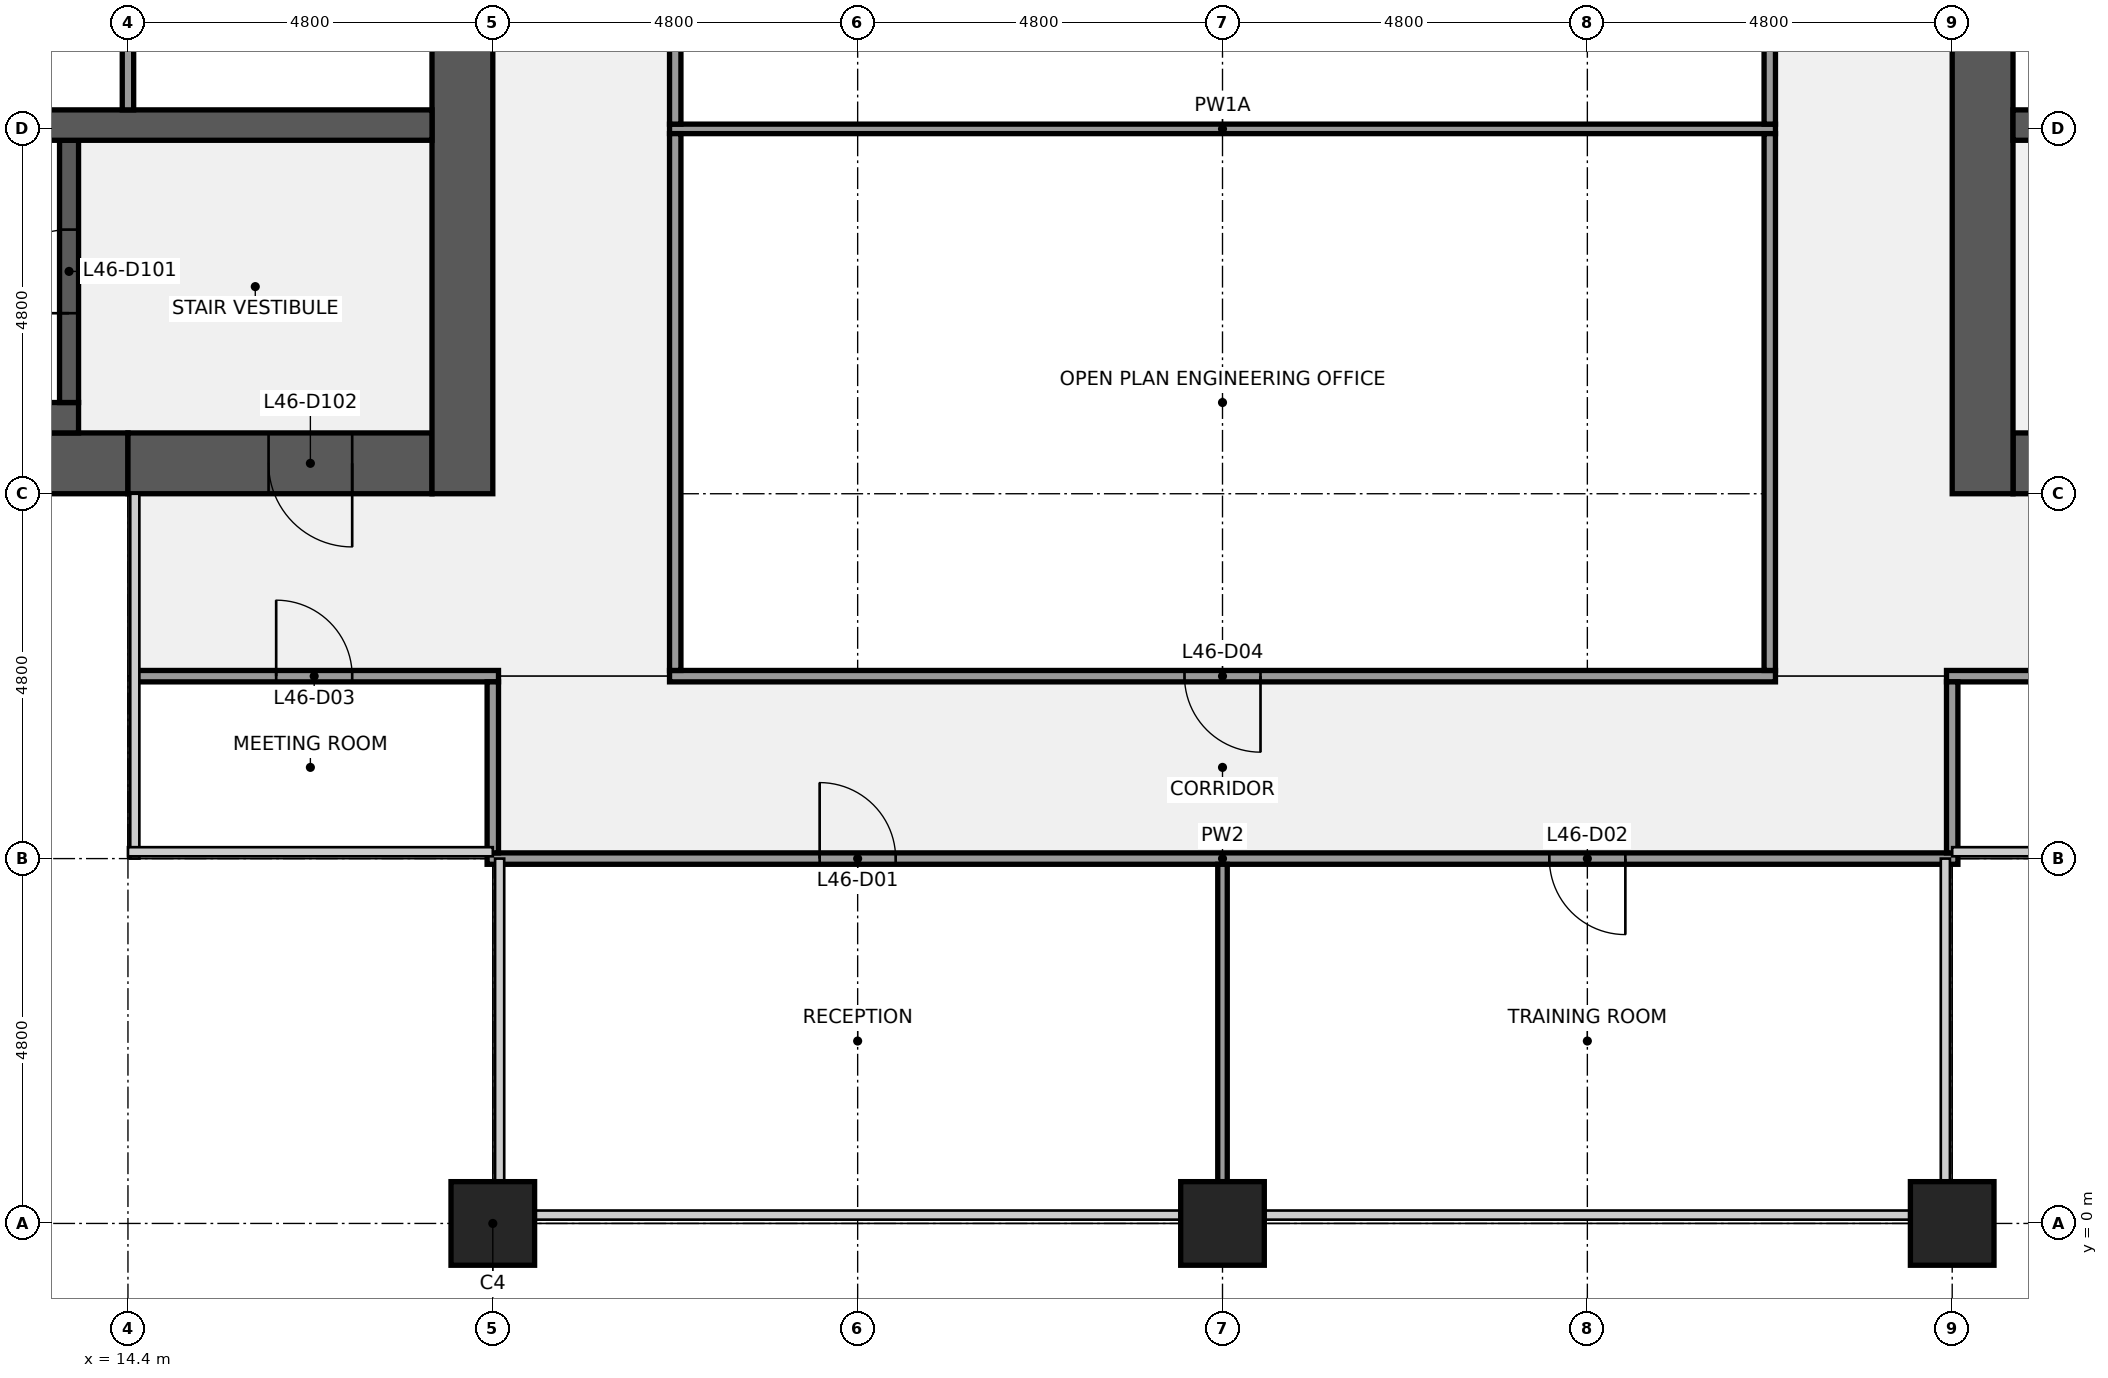
"""IFC4 building model, lengths in metres.
Left out: names, types, materials, properties, quantities, classifications, styles, units other than length and angle.
Written with IfcOpenShell. Run it as: python <this file> out.ifc"""

import sys

from ifc_helpers import new_model, si_unit, direction, frame, frame_2d, origin, origin_2d, place, context, subcontext, project, spatial, rectangle, extrude, element, fill, save


model = new_model("IFC4")
c1 = context("Model", 3, precision=1e-05, world=origin(), true_north=direction((0.0, 1.0)))
c2 = subcontext(c1, "Body", "Model", "MODEL_VIEW")
j1 = project(units=[si_unit("LENGTHUNIT", "METRE"), si_unit("PLANEANGLEUNIT", "RADIAN")], contexts=[c1])
p1 = place(None, origin())
s1 = spatial("IfcSite", under=j1, at=p1, CompositionType="ELEMENT")
p2 = place(p1, origin())
s2 = spatial("IfcBuilding", under=s1, at=p2, CompositionType="ELEMENT")
p3 = place(p2, frame((0.0, 0.0, 213.2)))
s3 = spatial("IfcBuildingStorey", under=s2, at=p3, CompositionType="ELEMENT", Elevation=213.2)
for number, where, z_axis, x_axis in (
    (1, (19.2, 0.0, 0.0), (0.0, 0.0, 1.0), (1.0, 0.0, 0.0)),
    (2, (28.8, 0.0, 0.0), (0.0, 0.0, 1.0), (1.0, 0.0, 0.0)),
    (3, (38.4, 0.0, 0.0), (0.0, 0.0, 1.0), (1.0, 0.0, 0.0)),
):
    element("IfcColumn", number, at=place(p3, frame(where, z_axis=z_axis, x_axis=x_axis)), inside=s3, PredefinedType="COLUMN", context=c2, shape_type="SweptSolid", body=[
        extrude(rectangle(XDim=1.1, YDim=1.1, at=origin_2d()), origin(), (0.0, 0.0, 1.0), 4.0),
    ])
p4 = place(p3, frame((14.4, 10.0, 0.0), z_axis=(0.0, 0.0, 1.0), x_axis=(-1.0, 0.0, 0.0)))
e4 = element("IfcWall", 4, at=p4, inside=s3, PredefinedType="SHEAR", context=c2, shape_type="SweptSolid", body=[
    extrude(rectangle(XDim=13.6, YDim=0.8, at=frame_2d((6.8, 0.0))), origin(), (0.0, 0.0, 1.0), 3.84),
])
p5 = place(p4, frame((6.3, 0.0, 0.9)))
e5 = element("IfcOpeningElement", 5, at=p5, cuts=e4, PredefinedType="OPENING", context=c2, shape_type="SweptSolid", body=[
    extrude(rectangle(XDim=1.8, YDim=1.5, at=frame_2d((0.9, 0.75))), frame((0.0, 0.41, 0.0), z_axis=(0.0, -1.0, 0.0), x_axis=(1.0, 0.0, 0.0)), (0.0, 0.0, 1.0), 0.82),
])
p6 = place(p4, frame((1.5, 0.0, 0.9)))
e6 = element("IfcOpeningElement", 6, at=p6, cuts=e4, PredefinedType="OPENING", context=c2, shape_type="SweptSolid", body=[
    extrude(rectangle(XDim=1.8, YDim=1.5, at=frame_2d((0.9, 0.75))), frame((0.0, 0.41, 0.0), z_axis=(0.0, -1.0, 0.0), x_axis=(1.0, 0.0, 0.0)), (0.0, 0.0, 1.0), 0.82),
])
p7 = place(p3, frame((18.4, 10.0, 0.0), z_axis=(0.0, 0.0, 1.0), x_axis=(-1.0, 0.0, 0.0)))
e7 = element("IfcWall", 7, at=p7, inside=s3, PredefinedType="SHEAR", context=c2, shape_type="SweptSolid", body=[
    extrude(rectangle(XDim=4.0, YDim=0.8, at=frame_2d((2.0, 0.0))), origin(), (0.0, 0.0, 1.0), 3.84),
])
p8 = place(p7, frame((1.05, 0.0, 0.0)))
e8 = element("IfcOpeningElement", 8, at=p8, cuts=e7, PredefinedType="OPENING", context=c2, shape_type="SweptSolid", body=[
    extrude(rectangle(XDim=1.1, YDim=2.1, at=frame_2d((0.55, 1.05))), frame((0.0, 0.41, 0.0), z_axis=(0.0, -1.0, 0.0), x_axis=(1.0, 0.0, 0.0)), (0.0, 0.0, 1.0), 0.82),
])
p9 = place(p3, frame((18.8, 38.4, 0.0), z_axis=(0.0, 0.0, 1.0), x_axis=(0.0, -1.0, 0.0)))
e9 = element("IfcWall", 9, at=p9, inside=s3, PredefinedType="SHEAR", context=c2, shape_type="SweptSolid", body=[
    extrude(rectangle(XDim=28.8, YDim=0.8, at=frame_2d((14.4, 0.0))), origin(), (0.0, 0.0, 1.0), 3.84),
])
p10 = place(p9, frame((18.3, 0.0, 0.0)))
e10 = element("IfcOpeningElement", 10, at=p10, cuts=e9, PredefinedType="OPENING", context=c2, shape_type="SweptSolid", body=[
    extrude(rectangle(XDim=1.8, YDim=2.1, at=frame_2d((0.9, 1.05))), frame((0.0, 0.41, 0.0), z_axis=(0.0, -1.0, 0.0), x_axis=(1.0, 0.0, 0.0)), (0.0, 0.0, 1.0), 0.82),
])
p11 = place(p9, frame((8.7, 0.0, 0.0)))
e11 = element("IfcOpeningElement", 11, at=p11, cuts=e9, PredefinedType="OPENING", context=c2, shape_type="SweptSolid", body=[
    extrude(rectangle(XDim=1.8, YDim=2.1, at=frame_2d((0.9, 1.05))), frame((0.0, 0.41, 0.0), z_axis=(0.0, -1.0, 0.0), x_axis=(1.0, 0.0, 0.0)), (0.0, 0.0, 1.0), 0.82),
])
p12 = place(p3, frame((6.25, 10.6, 0.0), z_axis=(0.0, 0.0, 1.0), x_axis=(1.0, 0.0, 0.0)))
e12 = element("IfcWall", 12, at=p12, inside=s3, PredefinedType="SHEAR", context=c2, shape_type="SweptSolid", body=[
    extrude(rectangle(XDim=7.5, YDim=0.4, at=frame_2d((3.75, 0.0))), origin(), (0.0, 0.0, 1.0), 3.84),
])
p13 = place(p3, frame((13.625, 10.8, 0.0), z_axis=(0.0, 0.0, 1.0), x_axis=(0.0, 1.0, 0.0)))
e13 = element("IfcWall", 13, at=p13, inside=s3, PredefinedType="SHEAR", context=c2, shape_type="SweptSolid", body=[
    extrude(rectangle(XDim=3.45, YDim=0.25, at=frame_2d((1.725, 0.0))), origin(), (0.0, 0.0, 1.0), 3.84),
])
p14 = place(p13, frame((1.175, 0.0, 0.0)))
e14 = element("IfcOpeningElement", 14, at=p14, cuts=e13, PredefinedType="OPENING", context=c2, shape_type="SweptSolid", body=[
    extrude(rectangle(XDim=1.1, YDim=2.1, at=frame_2d((0.55, 1.05))), frame((0.0, 0.135, 0.0), z_axis=(0.0, -1.0, 0.0), x_axis=(1.0, 0.0, 0.0)), (0.0, 0.0, 1.0), 0.27),
])
p15 = place(p3, frame((0.8, 14.45, 0.0), z_axis=(0.0, 0.0, 1.0), x_axis=(1.0, 0.0, 0.0)))
e15 = element("IfcWall", 15, at=p15, inside=s3, PredefinedType="SHEAR", context=c2, shape_type="SweptSolid", body=[
    extrude(rectangle(XDim=17.6, YDim=0.4, at=frame_2d((8.8, 0.0))), origin(), (0.0, 0.0, 1.0), 3.84),
])
p16 = place(p3, frame((14.4, 14.65, 0.0), z_axis=(0.0, 0.0, 1.0), x_axis=(0.0, 1.0, 0.0)))
e16 = element("IfcWall", 16, at=p16, inside=s3, PredefinedType="PARTITIONING", context=c2, shape_type="SweptSolid", body=[
    extrude(rectangle(XDim=2.6, YDim=0.15, at=frame_2d((1.3, 0.0))), origin(), (0.0, 0.0, 1.0), 3.84),
])
p17 = place(p3, frame((48.0, 10.0, 0.0), z_axis=(0.0, 0.0, 1.0), x_axis=(-1.0, 0.0, 0.0)))
e17 = element("IfcWall", 17, at=p17, inside=s3, PredefinedType="SHEAR", context=c2, shape_type="SweptSolid", body=[
    extrude(rectangle(XDim=8.8, YDim=0.8, at=frame_2d((4.4, 0.0))), origin(), (0.0, 0.0, 1.0), 3.84),
])
p18 = place(p17, frame((6.65, 0.0, 0.0)))
e18 = element("IfcOpeningElement", 18, at=p18, cuts=e17, PredefinedType="OPENING", context=c2, shape_type="SweptSolid", body=[
    extrude(rectangle(XDim=1.1, YDim=2.1, at=frame_2d((0.55, 1.05))), frame((0.0, 0.41, 0.0), z_axis=(0.0, -1.0, 0.0), x_axis=(1.0, 0.0, 0.0)), (0.0, 0.0, 1.0), 0.82),
])
p19 = place(p3, frame((38.8, 9.6, 0.0), z_axis=(0.0, 0.0, 1.0), x_axis=(0.0, 1.0, 0.0)))
e19 = element("IfcWall", 19, at=p19, inside=s3, PredefinedType="SHEAR", context=c2, shape_type="SweptSolid", body=[
    extrude(rectangle(XDim=28.8, YDim=0.8, at=frame_2d((14.4, 0.0))), origin(), (0.0, 0.0, 1.0), 3.84),
])
p20 = place(p19, frame((8.7, 0.0, 0.0)))
e20 = element("IfcOpeningElement", 20, at=p20, cuts=e19, PredefinedType="OPENING", context=c2, shape_type="SweptSolid", body=[
    extrude(rectangle(XDim=1.8, YDim=2.1, at=frame_2d((0.9, 1.05))), frame((0.0, 0.41, 0.0), z_axis=(0.0, -1.0, 0.0), x_axis=(1.0, 0.0, 0.0)), (0.0, 0.0, 1.0), 0.82),
])
p21 = place(p19, frame((18.3, 0.0, 0.0)))
e21 = element("IfcOpeningElement", 21, at=p21, cuts=e19, PredefinedType="OPENING", context=c2, shape_type="SweptSolid", body=[
    extrude(rectangle(XDim=1.8, YDim=2.1, at=frame_2d((0.9, 1.05))), frame((0.0, 0.41, 0.0), z_axis=(0.0, -1.0, 0.0), x_axis=(1.0, 0.0, 0.0)), (0.0, 0.0, 1.0), 0.82),
])
p22 = place(p3, frame((39.2, 14.45, 0.0), z_axis=(0.0, 0.0, 1.0), x_axis=(1.0, 0.0, 0.0)))
e22 = element("IfcWall", 22, at=p22, inside=s3, PredefinedType="SHEAR", context=c2, shape_type="SweptSolid", body=[
    extrude(rectangle(XDim=17.6, YDim=0.4, at=frame_2d((8.8, 0.0))), origin(), (0.0, 0.0, 1.0), 3.84),
])
p23 = place(p3, frame((19.125, 4.8, 0.0), z_axis=(0.0, 0.0, 1.0), x_axis=(1.0, 0.0, 0.0)))
e23 = element("IfcWall", 23, at=p23, inside=s3, PredefinedType="PARTITIONING", context=c2, shape_type="SweptSolid", body=[
    extrude(rectangle(XDim=19.35, YDim=0.15, at=frame_2d((9.675, 0.0))), origin(), (0.0, 0.0, 1.0), 2.87),
])
p24 = place(p23, frame((4.375, 0.0, 0.0)))
e24 = element("IfcOpeningElement", 24, at=p24, cuts=e23, PredefinedType="OPENING", context=c2, shape_type="SweptSolid", body=[
    extrude(rectangle(XDim=1.0, YDim=2.1, at=frame_2d((0.5, 1.05))), frame((0.0, 0.085, 0.0), z_axis=(0.0, -1.0, 0.0), x_axis=(1.0, 0.0, 0.0)), (0.0, 0.0, 1.0), 0.17),
])
p25 = place(p23, frame((13.975, 0.0, 0.0)))
e25 = element("IfcOpeningElement", 25, at=p25, cuts=e23, PredefinedType="OPENING", context=c2, shape_type="SweptSolid", body=[
    extrude(rectangle(XDim=1.0, YDim=2.1, at=frame_2d((0.5, 1.05))), frame((0.0, 0.085, 0.0), z_axis=(0.0, -1.0, 0.0), x_axis=(1.0, 0.0, 0.0)), (0.0, 0.0, 1.0), 0.17),
])
p26 = place(p3, frame((14.5, 7.2, 0.0), z_axis=(0.0, 0.0, 1.0), x_axis=(1.0, 0.0, 0.0)))
e26 = element("IfcWall", 26, at=p26, inside=s3, PredefinedType="PARTITIONING", context=c2, shape_type="SweptSolid", body=[
    extrude(rectangle(XDim=4.775, YDim=0.15, at=frame_2d((2.387, 0.0))), origin(), (0.0, 0.0, 1.0), 2.87),
])
p27 = place(p26, frame((1.85, 0.0, 0.0)))
e27 = element("IfcOpeningElement", 27, at=p27, cuts=e26, PredefinedType="OPENING", context=c2, shape_type="SweptSolid", body=[
    extrude(rectangle(XDim=1.0, YDim=2.1, at=frame_2d((0.5, 1.05))), frame((0.0, 0.085, 0.0), z_axis=(0.0, -1.0, 0.0), x_axis=(1.0, 0.0, 0.0)), (0.0, 0.0, 1.0), 0.17),
])
p28 = place(p3, frame((21.525, 7.2, 0.0), z_axis=(0.0, 0.0, 1.0), x_axis=(1.0, 0.0, 0.0)))
e28 = element("IfcWall", 28, at=p28, inside=s3, PredefinedType="PARTITIONING", context=c2, shape_type="SweptSolid", body=[
    extrude(rectangle(XDim=14.55, YDim=0.15, at=frame_2d((7.275, 0.0))), origin(), (0.0, 0.0, 1.0), 2.87),
])
p29 = place(p28, frame((6.775, 0.0, 0.0)))
e29 = element("IfcOpeningElement", 29, at=p29, cuts=e28, PredefinedType="OPENING", context=c2, shape_type="SweptSolid", body=[
    extrude(rectangle(XDim=1.0, YDim=2.1, at=frame_2d((0.5, 1.05))), frame((0.0, 0.085, 0.0), z_axis=(0.0, -1.0, 0.0), x_axis=(1.0, 0.0, 0.0)), (0.0, 0.0, 1.0), 0.17),
])
p30 = place(p3, frame((38.325, 7.2, 0.0), z_axis=(0.0, 0.0, 1.0), x_axis=(1.0, 0.0, 0.0)))
e30 = element("IfcWall", 30, at=p30, inside=s3, PredefinedType="PARTITIONING", context=c2, shape_type="SweptSolid", body=[
    extrude(rectangle(XDim=4.95, YDim=0.15, at=frame_2d((2.475, 0.0))), origin(), (0.0, 0.0, 1.0), 2.87),
])
p31 = place(p30, frame((1.975, 0.0, 0.0)))
e31 = element("IfcOpeningElement", 31, at=p31, cuts=e30, PredefinedType="OPENING", context=c2, shape_type="SweptSolid", body=[
    extrude(rectangle(XDim=1.0, YDim=2.1, at=frame_2d((0.5, 1.05))), frame((0.0, 0.085, 0.0), z_axis=(0.0, -1.0, 0.0), x_axis=(1.0, 0.0, 0.0)), (0.0, 0.0, 1.0), 0.17),
])
p32 = place(p3, frame((21.525, 14.4, 0.0), z_axis=(0.0, 0.0, 1.0), x_axis=(1.0, 0.0, 0.0)))
e32 = element("IfcWall", 32, at=p32, inside=s3, PredefinedType="PARTITIONING", context=c2, shape_type="SweptSolid", body=[
    extrude(rectangle(XDim=14.55, YDim=0.125, at=frame_2d((7.275, 0.0))), origin(), (0.0, 0.0, 1.0), 2.87),
])
p33 = place(p3, frame((19.2, 4.875, 0.0), z_axis=(0.0, 0.0, 1.0), x_axis=(0.0, 1.0, 0.0)))
e33 = element("IfcWall", 33, at=p33, inside=s3, PredefinedType="PARTITIONING", context=c2, shape_type="SweptSolid", body=[
    extrude(rectangle(XDim=2.25, YDim=0.15, at=frame_2d((1.125, 0.0))), origin(), (0.0, 0.0, 1.0), 2.87),
])
p34 = place(p3, frame((21.6, 7.275, 0.0), z_axis=(0.0, 0.0, 1.0), x_axis=(0.0, 1.0, 0.0)))
e34 = element("IfcWall", 34, at=p34, inside=s3, PredefinedType="PARTITIONING", context=c2, shape_type="SweptSolid", body=[
    extrude(rectangle(XDim=7.062, YDim=0.15, at=frame_2d((3.531, 0.0))), origin(), (0.0, 0.0, 1.0), 2.87),
])
p35 = place(p3, frame((21.6, 14.462, 0.0), z_axis=(0.0, 0.0, 1.0), x_axis=(0.0, 1.0, 0.0)))
e35 = element("IfcWall", 35, at=p35, inside=s3, PredefinedType="PARTITIONING", context=c2, shape_type="SweptSolid", body=[
    extrude(rectangle(XDim=7.075, YDim=0.15, at=frame_2d((3.538, 0.0))), origin(), (0.0, 0.0, 1.0), 2.87),
])
p36 = place(p35, frame((3.038, 0.0, 0.0)))
e36 = element("IfcOpeningElement", 36, at=p36, cuts=e35, PredefinedType="OPENING", context=c2, shape_type="SweptSolid", body=[
    extrude(rectangle(XDim=1.0, YDim=2.1, at=frame_2d((0.5, 1.05))), frame((0.0, 0.085, 0.0), z_axis=(0.0, -1.0, 0.0), x_axis=(1.0, 0.0, 0.0)), (0.0, 0.0, 1.0), 0.17),
])
p37 = place(p3, frame((28.8, 0.55, 0.0), z_axis=(0.0, 0.0, 1.0), x_axis=(0.0, 1.0, 0.0)))
e37 = element("IfcWall", 37, at=p37, inside=s3, PredefinedType="PARTITIONING", context=c2, shape_type="SweptSolid", body=[
    extrude(rectangle(XDim=4.175, YDim=0.125, at=frame_2d((2.087, 0.0))), origin(), (0.0, 0.0, 1.0), 2.87),
])
p38 = place(p3, frame((36.0, 7.275, 0.0), z_axis=(0.0, 0.0, 1.0), x_axis=(0.0, 1.0, 0.0)))
e38 = element("IfcWall", 38, at=p38, inside=s3, PredefinedType="PARTITIONING", context=c2, shape_type="SweptSolid", body=[
    extrude(rectangle(XDim=7.062, YDim=0.15, at=frame_2d((3.531, 0.0))), origin(), (0.0, 0.0, 1.0), 2.87),
])
p39 = place(p3, frame((36.0, 14.462, 0.0), z_axis=(0.0, 0.0, 1.0), x_axis=(0.0, 1.0, 0.0)))
e39 = element("IfcWall", 39, at=p39, inside=s3, PredefinedType="PARTITIONING", context=c2, shape_type="SweptSolid", body=[
    extrude(rectangle(XDim=7.075, YDim=0.15, at=frame_2d((3.538, 0.0))), origin(), (0.0, 0.0, 1.0), 2.87),
])
p40 = place(p3, frame((38.4, 4.875, 0.0), z_axis=(0.0, 0.0, 1.0), x_axis=(0.0, 1.0, 0.0)))
e40 = element("IfcWall", 40, at=p40, inside=s3, PredefinedType="PARTITIONING", context=c2, shape_type="SweptSolid", body=[
    extrude(rectangle(XDim=2.25, YDim=0.15, at=frame_2d((1.125, 0.0))), origin(), (0.0, 0.0, 1.0), 2.87),
])
for number, where, z_axis, x_axis in (
    (41, (19.2, -1.025, 0.0), (0.0, 0.0, 1.0), (1.0, 0.0, 0.0)),
    (42, (38.4, -1.025, 0.0), (0.0, 0.0, 1.0), (1.0, 0.0, 0.0)),
):
    element("IfcColumn", number, at=place(p3, frame(where, z_axis=z_axis, x_axis=x_axis)), inside=s3, PredefinedType="PILASTER", context=c2, shape_type="SweptSolid", body=[
        extrude(rectangle(XDim=2.4, YDim=0.95, at=origin_2d()), origin(), (0.0, 0.0, 1.0), 4.0),
    ])
p41 = place(p14, origin())
e43 = element("IfcDoor", 43, at=p41, inside=s3, OperationType="SINGLE_SWING_LEFT", PredefinedType="DOOR", context=c2, shape_type="SweptSolid", body=[
    extrude(rectangle(XDim=1.1, YDim=2.1, at=frame_2d((0.55, 1.05))), frame((0.0, 0.025, 0.0), z_axis=(0.0, -1.0, 0.0), x_axis=(1.0, 0.0, 0.0)), (0.0, 0.0, 1.0), 0.05),
])
fill(e14, e43)
p42 = place(p8, origin())
e44 = element("IfcDoor", 44, at=p42, inside=s3, OperationType="SINGLE_SWING_LEFT", PredefinedType="DOOR", context=c2, shape_type="SweptSolid", body=[
    extrude(rectangle(XDim=1.1, YDim=2.1, at=frame_2d((0.55, 1.05))), frame((0.0, 0.025, 0.0), z_axis=(0.0, -1.0, 0.0), x_axis=(1.0, 0.0, 0.0)), (0.0, 0.0, 1.0), 0.05),
])
fill(e8, e44)
p43 = place(p24, origin())
e45 = element("IfcDoor", 45, at=p43, inside=s3, OperationType="SINGLE_SWING_LEFT", PredefinedType="DOOR", context=c2, shape_type="SweptSolid", body=[
    extrude(rectangle(XDim=1.0, YDim=2.1, at=frame_2d((0.5, 1.05))), frame((0.0, 0.025, 0.0), z_axis=(0.0, -1.0, 0.0), x_axis=(1.0, 0.0, 0.0)), (0.0, 0.0, 1.0), 0.05),
])
fill(e24, e45)
p44 = place(p25, origin())
e46 = element("IfcDoor", 46, at=p44, inside=s3, OperationType="SINGLE_SWING_RIGHT", PredefinedType="DOOR", context=c2, shape_type="SweptSolid", body=[
    extrude(rectangle(XDim=1.0, YDim=2.1, at=frame_2d((0.5, 1.05))), frame((0.0, 0.025, 0.0), z_axis=(0.0, -1.0, 0.0), x_axis=(1.0, 0.0, 0.0)), (0.0, 0.0, 1.0), 0.05),
])
fill(e25, e46)
p45 = place(p27, origin())
e47 = element("IfcDoor", 47, at=p45, inside=s3, OperationType="SINGLE_SWING_LEFT", PredefinedType="DOOR", context=c2, shape_type="SweptSolid", body=[
    extrude(rectangle(XDim=1.0, YDim=2.1, at=frame_2d((0.5, 1.05))), frame((0.0, 0.025, 0.0), z_axis=(0.0, -1.0, 0.0), x_axis=(1.0, 0.0, 0.0)), (0.0, 0.0, 1.0), 0.05),
])
fill(e27, e47)
p46 = place(p29, origin())
e48 = element("IfcDoor", 48, at=p46, inside=s3, OperationType="SINGLE_SWING_RIGHT", PredefinedType="DOOR", context=c2, shape_type="SweptSolid", body=[
    extrude(rectangle(XDim=1.0, YDim=2.1, at=frame_2d((0.5, 1.05))), frame((0.0, 0.025, 0.0), z_axis=(0.0, -1.0, 0.0), x_axis=(1.0, 0.0, 0.0)), (0.0, 0.0, 1.0), 0.05),
])
fill(e29, e48)
save(model, sys.argv[1])
